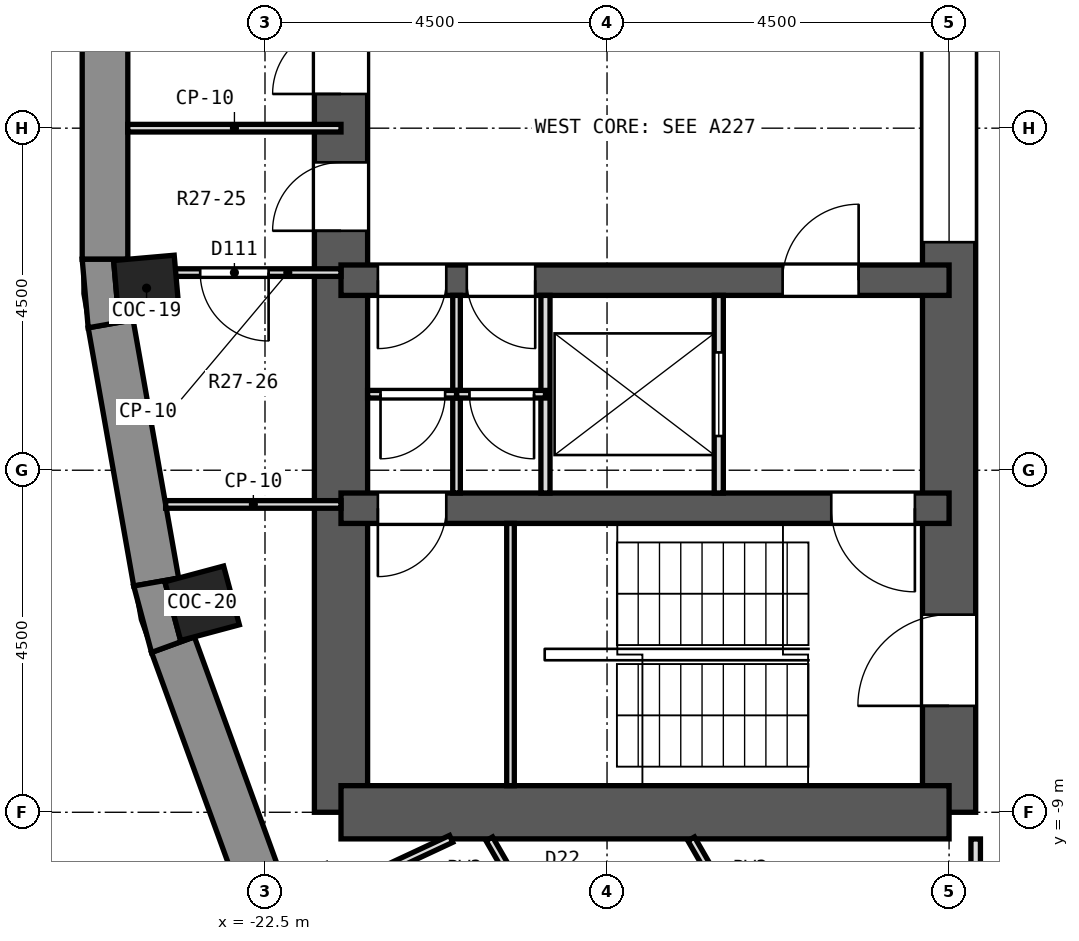
"""IFC4 building model, lengths in metres.
Left out: names, types, materials, properties, quantities, classifications, styles, units other than length and angle.
Written with IfcOpenShell. Run it as: python <this file> out.ifc"""

import sys

from ifc_helpers import new_model, si_unit, direction, frame, frame_2d, origin, origin_2d, place, context, subcontext, project, spatial, polyline, rectangle, outline, extrude, element, fill, save


model = new_model("IFC4")
c1 = context("Model", 3, precision=1e-05, world=origin(), true_north=direction((0.0, 1.0)))
c2 = subcontext(c1, "Body", "Model", "MODEL_VIEW")
j1 = project(units=[si_unit("LENGTHUNIT", "METRE"), si_unit("PLANEANGLEUNIT", "RADIAN")], contexts=[c1])
p1 = place(None, origin())
s1 = spatial("IfcSite", under=j1, at=p1, CompositionType="ELEMENT")
p2 = place(p1, origin())
s2 = spatial("IfcBuilding", under=s1, at=p2, CompositionType="ELEMENT")
p3 = place(p2, frame((0.0, 0.0, 180.6)))
s3 = spatial("IfcBuildingStorey", under=s2, at=p3, CompositionType="ELEMENT", Elevation=180.6)
for number, where, z_axis, x_axis in (
    (1, (-24.058, -2.105, 0.0), (0.0, 0.0, 1.0), (-0.996, -0.087, 0.0)),
    (2, (-23.327, -6.25, 0.0), (0.0, 0.0, 1.0), (-0.966, -0.259, 0.0)),
):
    element("IfcColumn", number, at=place(p3, frame(where, z_axis=z_axis, x_axis=x_axis)), inside=s3, PredefinedType="COLUMN", context=c2, shape_type="SweptSolid", body=[
        extrude(rectangle(XDim=0.8, YDim=0.8, at=origin_2d()), origin(), (0.0, 0.0, 1.0), 3.3),
    ])
p4 = place(p3, frame((-13.5, -9.0, 0.0), z_axis=(0.0, 0.0, 1.0), x_axis=(0.0, 1.0, 0.0)))
e3 = element("IfcWall", 3, at=p4, inside=s3, PredefinedType="SHEAR", context=c2, shape_type="SweptSolid", body=[
    extrude(rectangle(XDim=18.0, YDim=0.7, at=frame_2d((9.0, 0.0))), origin(), (0.0, 0.0, 1.0), 3.3),
])
p5 = place(p4, frame((15.4, 0.0, 0.0)))
e4 = element("IfcOpeningElement", 4, at=p5, cuts=e3, PredefinedType="OPENING", context=c2, shape_type="SweptSolid", body=[
    extrude(rectangle(XDim=1.2, YDim=2.1, at=frame_2d((0.6, 1.05))), frame((0.0, 0.362, 0.0), z_axis=(0.0, -1.0, 0.0), x_axis=(1.0, 0.0, 0.0)), (0.0, 0.0, 1.0), 0.724),
])
p6 = place(p4, frame((1.4, 0.0, 0.0)))
e5 = element("IfcOpeningElement", 5, at=p6, cuts=e3, PredefinedType="OPENING", context=c2, shape_type="SweptSolid", body=[
    extrude(rectangle(XDim=1.2, YDim=2.1, at=frame_2d((0.6, 1.05))), frame((0.0, 0.362, 0.0), z_axis=(0.0, -1.0, 0.0), x_axis=(1.0, 0.0, 0.0)), (0.0, 0.0, 1.0), 0.724),
])
p7 = place(p4, frame((7.5, 0.0, 0.0)))
e6 = element("IfcOpeningElement", 6, at=p7, cuts=e3, PredefinedType="OPENING", context=c2, shape_type="SweptSolid", body=[
    extrude(rectangle(XDim=3.0, YDim=2.4, at=frame_2d((1.5, 1.2))), frame((0.0, 0.362, 0.0), z_axis=(0.0, -1.0, 0.0), x_axis=(1.0, 0.0, 0.0)), (0.0, 0.0, 1.0), 0.724),
])
p8 = place(p3, frame((-21.5, -9.0, 0.0), z_axis=(0.0, 0.0, 1.0), x_axis=(0.0, 1.0, 0.0)))
e7 = element("IfcWall", 7, at=p8, inside=s3, PredefinedType="SHEAR", context=c2, shape_type="SweptSolid", body=[
    extrude(rectangle(XDim=18.0, YDim=0.7, at=frame_2d((9.0, 0.0))), origin(), (0.0, 0.0, 1.0), 3.3),
])
p9 = place(p8, frame((9.45, 0.0, 0.0)))
e8 = element("IfcOpeningElement", 8, at=p9, cuts=e7, PredefinedType="OPENING", context=c2, shape_type="SweptSolid", body=[
    extrude(rectangle(XDim=0.9, YDim=2.1, at=frame_2d((0.45, 1.05))), frame((0.0, 0.362, 0.0), z_axis=(0.0, -1.0, 0.0), x_axis=(1.0, 0.0, 0.0)), (0.0, 0.0, 1.0), 0.724),
])
p10 = place(p8, frame((7.65, 0.0, 0.0)))
e9 = element("IfcOpeningElement", 9, at=p10, cuts=e7, PredefinedType="OPENING", context=c2, shape_type="SweptSolid", body=[
    extrude(rectangle(XDim=0.9, YDim=2.1, at=frame_2d((0.45, 1.05))), frame((0.0, 0.362, 0.0), z_axis=(0.0, -1.0, 0.0), x_axis=(1.0, 0.0, 0.0)), (0.0, 0.0, 1.0), 0.724),
])
p11 = place(p3, frame((-13.5, -9.0, 0.0), z_axis=(0.0, 0.0, 1.0), x_axis=(-1.0, 0.0, 0.0)))
e10 = element("IfcWall", 10, at=p11, inside=s3, PredefinedType="SHEAR", context=c2, shape_type="SweptSolid", body=[
    extrude(rectangle(XDim=8.0, YDim=0.7, at=frame_2d((4.0, 0.0))), origin(), (0.0, 0.0, 1.0), 3.3),
])
p12 = place(p3, frame((-13.5, -5.0, 0.0), z_axis=(0.0, 0.0, 1.0), x_axis=(-1.0, 0.0, 0.0)))
e11 = element("IfcWall", 11, at=p12, inside=s3, PredefinedType="SHEAR", context=c2, shape_type="SweptSolid", body=[
    extrude(rectangle(XDim=8.0, YDim=0.4, at=frame_2d((4.0, 0.0))), origin(), (0.0, 0.0, 1.0), 3.3),
])
p13 = place(p12, frame((6.615, 0.0, 0.0)))
e12 = element("IfcOpeningElement", 12, at=p13, cuts=e11, PredefinedType="OPENING", context=c2, shape_type="SweptSolid", body=[
    extrude(rectangle(XDim=0.9, YDim=2.1, at=frame_2d((0.45, 1.05))), frame((0.0, 0.212, 0.0), z_axis=(0.0, -1.0, 0.0), x_axis=(1.0, 0.0, 0.0)), (0.0, 0.0, 1.0), 0.424),
])
p14 = place(p12, frame((0.45, 0.0, 0.0)))
e13 = element("IfcOpeningElement", 13, at=p14, cuts=e11, PredefinedType="OPENING", context=c2, shape_type="SweptSolid", body=[
    extrude(rectangle(XDim=1.1, YDim=2.1, at=frame_2d((0.55, 1.05))), frame((0.0, 0.212, 0.0), z_axis=(0.0, -1.0, 0.0), x_axis=(1.0, 0.0, 0.0)), (0.0, 0.0, 1.0), 0.424),
])
p15 = place(p3, frame((-13.5, -2.0, 0.0), z_axis=(0.0, 0.0, 1.0), x_axis=(-1.0, 0.0, 0.0)))
e14 = element("IfcWall", 14, at=p15, inside=s3, PredefinedType="SHEAR", context=c2, shape_type="SweptSolid", body=[
    extrude(rectangle(XDim=8.0, YDim=0.4, at=frame_2d((4.0, 0.0))), origin(), (0.0, 0.0, 1.0), 3.3),
])
p16 = place(p15, frame((1.19, 0.0, 0.0)))
e15 = element("IfcOpeningElement", 15, at=p16, cuts=e14, PredefinedType="OPENING", context=c2, shape_type="SweptSolid", body=[
    extrude(rectangle(XDim=1.0, YDim=2.1, at=frame_2d((0.5, 1.05))), frame((0.0, 0.212, 0.0), z_axis=(0.0, -1.0, 0.0), x_axis=(1.0, 0.0, 0.0)), (0.0, 0.0, 1.0), 0.424),
])
p17 = place(p15, frame((5.445, 0.0, 0.0)))
e16 = element("IfcOpeningElement", 16, at=p17, cuts=e14, PredefinedType="OPENING", context=c2, shape_type="SweptSolid", body=[
    extrude(rectangle(XDim=0.9, YDim=2.1, at=frame_2d((0.45, 1.05))), frame((0.0, 0.212, 0.0), z_axis=(0.0, -1.0, 0.0), x_axis=(1.0, 0.0, 0.0)), (0.0, 0.0, 1.0), 0.424),
])
p18 = place(p15, frame((6.615, 0.0, 0.0)))
e17 = element("IfcOpeningElement", 17, at=p18, cuts=e14, PredefinedType="OPENING", context=c2, shape_type="SweptSolid", body=[
    extrude(rectangle(XDim=0.9, YDim=2.1, at=frame_2d((0.45, 1.05))), frame((0.0, 0.212, 0.0), z_axis=(0.0, -1.0, 0.0), x_axis=(1.0, 0.0, 0.0)), (0.0, 0.0, 1.0), 0.424),
])
for number, where, z_axis, x_axis in (
    (18, (-24.605, 1.725, 0.0), (0.0, 0.0, 1.0), (0.0, -1.0, 0.0)),
    (19, (-24.531, -2.574, 0.0), (0.0, 0.0, 1.0), (0.174, -0.985, 0.0)),
    (20, (-23.711, -6.794, 0.0), (0.0, 0.0, 1.0), (0.342, -0.94, 0.0)),
):
    element("IfcWall", number, at=place(p3, frame(where, z_axis=z_axis, x_axis=x_axis)), inside=s3, PredefinedType="SOLIDWALL", context=c2, shape_type="SweptSolid", body=[
        extrude(rectangle(XDim=3.45, YDim=0.6, at=frame_2d((1.725, 0.0))), origin(), (0.0, 0.0, 1.0), 2.85),
    ])
p19 = place(p3, origin())
e21 = element("IfcWall", 21, at=p19, inside=s3, PredefinedType="SOLIDWALL", context=c2, shape_type="SweptSolid", body=[
    extrude(outline(polyline([(-24.905, -1.725), (-24.826, -2.626), (-24.235, -2.522), (-24.422, -2.538), (-24.491, -1.741), (-24.305, -1.725), (-24.905, -1.725)])), origin(), (0.0, 0.0, 1.0), 2.85),
])
p20 = place(p3, origin())
e22 = element("IfcWall", 22, at=p20, inside=s3, PredefinedType="SOLIDWALL", context=c2, shape_type="SweptSolid", body=[
    extrude(outline(polyline([(-24.227, -6.023), (-23.993, -6.897), (-23.429, -6.692), (-23.61, -6.74), (-23.817, -5.968), (-23.636, -5.919), (-24.227, -6.023)])), origin(), (0.0, 0.0, 1.0), 2.85),
])
p21 = place(p3, frame((-19.549, -9.35, 0.0), z_axis=(0.0, 0.0, 1.0), x_axis=(0.500006872736, -0.866021435772, 0.0)))
e23 = element("IfcWall", 23, at=p21, inside=s3, PredefinedType="PARTITIONING", context=c2, shape_type="SweptSolid", body=[
    extrude(rectangle(XDim=2.254, YDim=0.1, at=frame_2d((1.127, 0.0))), origin(), (0.0, 0.0, 1.0), 2.85),
])
p22 = place(p21, frame((0.727, 0.0, 0.0)))
e24 = element("IfcOpeningElement", 24, at=p22, cuts=e23, PredefinedType="OPENING", context=c2, shape_type="SweptSolid", body=[
    extrude(rectangle(XDim=0.8, YDim=2.1, at=frame_2d((0.4, 1.05))), frame((0.0, 0.062, 0.0), z_axis=(0.0, -1.0, 0.0), x_axis=(1.0, 0.0, 0.0)), (0.0, 0.0, 1.0), 0.124),
])
p23 = place(p3, frame((-16.893, -9.35, 0.0), z_axis=(0.0, 0.0, 1.0), x_axis=(0.499699344759, -0.866198917598, 0.0)))
e25 = element("IfcWall", 25, at=p23, inside=s3, PredefinedType="PARTITIONING", context=c2, shape_type="SweptSolid", body=[
    extrude(rectangle(XDim=0.915, YDim=0.1, at=frame_2d((0.457, 0.0))), origin(), (0.0, 0.0, 1.0), 2.85),
])
p24 = place(p3, frame((-21.516, -10.033, 0.0), z_axis=(0.0, 0.0, 1.0), x_axis=(0.906329754533, 0.422571149096, 0.0)))
e26 = element("IfcWall", 26, at=p24, inside=s3, PredefinedType="PARTITIONING", context=c2, shape_type="SweptSolid", body=[
    extrude(rectangle(XDim=1.616, YDim=0.1, at=frame_2d((0.808, 0.0))), origin(), (0.0, 0.0, 1.0), 2.85),
])
p25 = place(p3, frame((-13.15, -11.567, 0.0), z_axis=(0.0, 0.0, 1.0), x_axis=(0.0, 1.0, 0.0)))
e27 = element("IfcWall", 27, at=p25, inside=s3, PredefinedType="PARTITIONING", context=c2, shape_type="SweptSolid", body=[
    extrude(rectangle(XDim=2.216, YDim=0.125, at=frame_2d((1.108, 0.0))), origin(), (0.0, 0.0, 1.0), 2.85),
])
p26 = place(p3, frame((-21.5, -4.95, 0.0), z_axis=(0.0, 0.0, 1.0), x_axis=(-1.0, 0.0, 0.0)))
e28 = element("IfcWall", 28, at=p26, inside=s3, PredefinedType="PARTITIONING", context=c2, shape_type="SweptSolid", body=[
    extrude(rectangle(XDim=2.307, YDim=0.1, at=frame_2d((1.153, 0.0))), origin(), (0.0, 0.0, 1.0), 2.85),
])
p27 = place(p3, frame((-21.5, -1.9, 0.0), z_axis=(0.0, 0.0, 1.0), x_axis=(-1.0, 0.0, 0.0)))
e29 = element("IfcWall", 29, at=p27, inside=s3, PredefinedType="PARTITIONING", context=c2, shape_type="SweptSolid", body=[
    extrude(rectangle(XDim=2.805, YDim=0.1, at=frame_2d((1.402, 0.0))), origin(), (0.0, 0.0, 1.0), 2.85),
])
p28 = place(p27, frame((0.952, 0.0, 0.0)))
e30 = element("IfcOpeningElement", 30, at=p28, cuts=e29, PredefinedType="OPENING", context=c2, shape_type="SweptSolid", body=[
    extrude(rectangle(XDim=0.9, YDim=2.1, at=frame_2d((0.45, 1.05))), frame((0.0, 0.062, 0.0), z_axis=(0.0, -1.0, 0.0), x_axis=(1.0, 0.0, 0.0)), (0.0, 0.0, 1.0), 0.124),
])
p29 = place(p3, frame((-21.5, 0.0, 0.0), z_axis=(0.0, 0.0, 1.0), x_axis=(-1.0, 0.0, 0.0)))
e31 = element("IfcWall", 31, at=p29, inside=s3, PredefinedType="PARTITIONING", context=c2, shape_type="SweptSolid", body=[
    extrude(rectangle(XDim=2.805, YDim=0.1, at=frame_2d((1.402, 0.0))), origin(), (0.0, 0.0, 1.0), 2.85),
])
p30 = place(p3, frame((-16.53, -4.8, 0.0), z_axis=(0.0, 0.0, 1.0), x_axis=(0.0, 1.0, 0.0)))
e32 = element("IfcWall", 32, at=p30, inside=s3, PredefinedType="PARTITIONING", context=c2, shape_type="SweptSolid", body=[
    extrude(rectangle(XDim=2.6, YDim=0.12, at=frame_2d((1.3, 0.0))), origin(), (0.0, 0.0, 1.0), 2.85),
])
p31 = place(p30, frame((0.75, 0.0, 0.0)))
e33 = element("IfcOpeningElement", 33, at=p31, cuts=e32, PredefinedType="OPENING", context=c2, shape_type="SweptSolid", body=[
    extrude(rectangle(XDim=1.1, YDim=2.1, at=frame_2d((0.55, 1.05))), frame((0.0, 0.072, 0.0), z_axis=(0.0, -1.0, 0.0), x_axis=(1.0, 0.0, 0.0)), (0.0, 0.0, 1.0), 0.144),
])
p32 = place(p3, frame((-18.81, -4.8, 0.0), z_axis=(0.0, 0.0, 1.0), x_axis=(0.0, 1.0, 0.0)))
e34 = element("IfcWall", 34, at=p32, inside=s3, PredefinedType="PARTITIONING", context=c2, shape_type="SweptSolid", body=[
    extrude(rectangle(XDim=2.6, YDim=0.12, at=frame_2d((1.3, 0.0))), origin(), (0.0, 0.0, 1.0), 2.85),
])
p33 = place(p3, frame((-19.98, -4.8, 0.0), z_axis=(0.0, 0.0, 1.0), x_axis=(0.0, 1.0, 0.0)))
e35 = element("IfcWall", 35, at=p33, inside=s3, PredefinedType="PARTITIONING", context=c2, shape_type="SweptSolid", body=[
    extrude(rectangle(XDim=2.6, YDim=0.1, at=frame_2d((1.3, 0.0))), origin(), (0.0, 0.0, 1.0), 2.85),
])
p34 = place(p3, frame((-18.81, -3.5, 0.0), z_axis=(0.0, 0.0, 1.0), x_axis=(-1.0, 0.0, 0.0)))
e36 = element("IfcWall", 36, at=p34, inside=s3, PredefinedType="PARTITIONING", context=c2, shape_type="SweptSolid", body=[
    extrude(rectangle(XDim=1.17, YDim=0.1, at=frame_2d((0.585, 0.0))), origin(), (0.0, 0.0, 1.0), 2.85),
])
p35 = place(p34, frame((0.15, 0.0, 0.0)))
e37 = element("IfcOpeningElement", 37, at=p35, cuts=e36, PredefinedType="OPENING", context=c2, shape_type="SweptSolid", body=[
    extrude(rectangle(XDim=0.85, YDim=2.1, at=frame_2d((0.425, 1.05))), frame((0.0, 0.062, 0.0), z_axis=(0.0, -1.0, 0.0), x_axis=(1.0, 0.0, 0.0)), (0.0, 0.0, 1.0), 0.124),
])
p36 = place(p3, frame((-19.98, -3.5, 0.0), z_axis=(0.0, 0.0, 1.0), x_axis=(-1.0, 0.0, 0.0)))
e38 = element("IfcWall", 38, at=p36, inside=s3, PredefinedType="PARTITIONING", context=c2, shape_type="SweptSolid", body=[
    extrude(rectangle(XDim=1.17, YDim=0.1, at=frame_2d((0.585, 0.0))), origin(), (0.0, 0.0, 1.0), 2.85),
])
p37 = place(p36, frame((0.15, 0.0, 0.0)))
e39 = element("IfcOpeningElement", 39, at=p37, cuts=e38, PredefinedType="OPENING", context=c2, shape_type="SweptSolid", body=[
    extrude(rectangle(XDim=0.85, YDim=2.1, at=frame_2d((0.425, 1.05))), frame((0.0, 0.062, 0.0), z_axis=(0.0, -1.0, 0.0), x_axis=(1.0, 0.0, 0.0)), (0.0, 0.0, 1.0), 0.124),
])
p38 = place(p3, frame((-19.27, -8.65, 0.0), z_axis=(0.0, 0.0, 1.0), x_axis=(0.0, 1.0, 0.0)))
e40 = element("IfcWall", 40, at=p38, inside=s3, PredefinedType="PARTITIONING", context=c2, shape_type="SweptSolid", body=[
    extrude(rectangle(XDim=3.45, YDim=0.1, at=frame_2d((1.725, 0.0))), origin(), (0.0, 0.0, 1.0), 2.85),
])
p39 = place(p31, origin())
e41 = element("IfcDoor", 41, at=p39, inside=s3, OperationType="DOUBLE_DOOR_SLIDING", PredefinedType="DOOR", context=c2, shape_type="SweptSolid", body=[
    extrude(rectangle(XDim=1.1, YDim=2.1, at=frame_2d((0.55, 1.05))), frame((0.0, 0.025, 0.0), z_axis=(0.0, -1.0, 0.0), x_axis=(1.0, 0.0, 0.0)), (0.0, 0.0, 1.0), 0.05),
])
fill(e33, e41)
p40 = place(p16, frame((1.0, 0.0, 0.0), z_axis=(0.0, 0.0, 1.0), x_axis=(-1.0, 0.0, 0.0)))
e42 = element("IfcDoor", 42, at=p40, inside=s3, OperationType="SINGLE_SWING_RIGHT", PredefinedType="DOOR", context=c2, shape_type="SweptSolid", body=[
    extrude(rectangle(XDim=1.0, YDim=2.1, at=frame_2d((0.5, 1.05))), frame((0.0, 0.025, 0.0), z_axis=(0.0, -1.0, 0.0), x_axis=(1.0, 0.0, 0.0)), (0.0, 0.0, 1.0), 0.05),
])
fill(e15, e42)
p41 = place(p17, origin())
e43 = element("IfcDoor", 43, at=p41, inside=s3, OperationType="SINGLE_SWING_LEFT", PredefinedType="DOOR", context=c2, shape_type="SweptSolid", body=[
    extrude(rectangle(XDim=0.9, YDim=2.1, at=frame_2d((0.45, 1.05))), frame((0.0, 0.025, 0.0), z_axis=(0.0, -1.0, 0.0), x_axis=(1.0, 0.0, 0.0)), (0.0, 0.0, 1.0), 0.05),
])
fill(e16, e43)
p42 = place(p18, origin())
e44 = element("IfcDoor", 44, at=p42, inside=s3, OperationType="SINGLE_SWING_RIGHT", PredefinedType="DOOR", context=c2, shape_type="SweptSolid", body=[
    extrude(rectangle(XDim=0.9, YDim=2.1, at=frame_2d((0.45, 1.05))), frame((0.0, 0.025, 0.0), z_axis=(0.0, -1.0, 0.0), x_axis=(1.0, 0.0, 0.0)), (0.0, 0.0, 1.0), 0.05),
])
fill(e17, e44)
p43 = place(p9, origin())
e45 = element("IfcDoor", 45, at=p43, inside=s3, OperationType="SINGLE_SWING_LEFT", PredefinedType="DOOR", context=c2, shape_type="SweptSolid", body=[
    extrude(rectangle(XDim=0.9, YDim=2.1, at=frame_2d((0.45, 1.05))), frame((0.0, 0.025, 0.0), z_axis=(0.0, -1.0, 0.0), x_axis=(1.0, 0.0, 0.0)), (0.0, 0.0, 1.0), 0.05),
])
fill(e8, e45)
p44 = place(p28, origin())
e46 = element("IfcDoor", 46, at=p44, inside=s3, OperationType="SINGLE_SWING_LEFT", PredefinedType="DOOR", context=c2, shape_type="SweptSolid", body=[
    extrude(rectangle(XDim=0.9, YDim=2.1, at=frame_2d((0.45, 1.05))), frame((0.0, 0.025, 0.0), z_axis=(0.0, -1.0, 0.0), x_axis=(1.0, 0.0, 0.0)), (0.0, 0.0, 1.0), 0.05),
])
fill(e30, e46)
p45 = place(p10, origin())
e47 = element("IfcDoor", 47, at=p45, inside=s3, OperationType="SINGLE_SWING_LEFT", PredefinedType="DOOR", context=c2, shape_type="SweptSolid", body=[
    extrude(rectangle(XDim=0.9, YDim=2.1, at=frame_2d((0.45, 1.05))), frame((0.0, 0.025, 0.0), z_axis=(0.0, -1.0, 0.0), x_axis=(1.0, 0.0, 0.0)), (0.0, 0.0, 1.0), 0.05),
])
fill(e9, e47)
p46 = place(p35, origin())
e48 = element("IfcDoor", 48, at=p46, inside=s3, OperationType="SINGLE_SWING_LEFT", PredefinedType="DOOR", context=c2, shape_type="SweptSolid", body=[
    extrude(rectangle(XDim=0.85, YDim=2.1, at=frame_2d((0.425, 1.05))), frame((0.0, 0.025, 0.0), z_axis=(0.0, -1.0, 0.0), x_axis=(1.0, 0.0, 0.0)), (0.0, 0.0, 1.0), 0.05),
])
fill(e37, e48)
p47 = place(p37, origin())
e49 = element("IfcDoor", 49, at=p47, inside=s3, OperationType="SINGLE_SWING_RIGHT", PredefinedType="DOOR", context=c2, shape_type="SweptSolid", body=[
    extrude(rectangle(XDim=0.85, YDim=2.1, at=frame_2d((0.425, 1.05))), frame((0.0, 0.025, 0.0), z_axis=(0.0, -1.0, 0.0), x_axis=(1.0, 0.0, 0.0)), (0.0, 0.0, 1.0), 0.05),
])
fill(e39, e49)
p48 = place(p13, origin())
e50 = element("IfcDoor", 50, at=p48, inside=s3, OperationType="SINGLE_SWING_RIGHT", PredefinedType="DOOR", context=c2, shape_type="SweptSolid", body=[
    extrude(rectangle(XDim=0.9, YDim=2.1, at=frame_2d((0.45, 1.05))), frame((0.0, 0.025, 0.0), z_axis=(0.0, -1.0, 0.0), x_axis=(1.0, 0.0, 0.0)), (0.0, 0.0, 1.0), 0.05),
])
fill(e12, e50)
p49 = place(p14, origin())
e51 = element("IfcDoor", 51, at=p49, inside=s3, OperationType="SINGLE_SWING_LEFT", PredefinedType="DOOR", context=c2, shape_type="SweptSolid", body=[
    extrude(rectangle(XDim=1.1, YDim=2.1, at=frame_2d((0.55, 1.05))), frame((0.0, 0.025, 0.0), z_axis=(0.0, -1.0, 0.0), x_axis=(1.0, 0.0, 0.0)), (0.0, 0.0, 1.0), 0.05),
])
fill(e13, e51)
p50 = place(p6, origin())
e52 = element("IfcDoor", 52, at=p50, inside=s3, OperationType="SINGLE_SWING_LEFT", PredefinedType="DOOR", context=c2, shape_type="SweptSolid", body=[
    extrude(rectangle(XDim=1.2, YDim=2.1, at=frame_2d((0.6, 1.05))), frame((0.0, 0.025, 0.0), z_axis=(0.0, -1.0, 0.0), x_axis=(1.0, 0.0, 0.0)), (0.0, 0.0, 1.0), 0.05),
])
fill(e5, e52)
p51 = place(p7, origin())
e53 = element("IfcDoor", 53, at=p51, inside=s3, OperationType="DOUBLE_DOOR_SLIDING", PredefinedType="DOOR", context=c2, shape_type="SweptSolid", body=[
    extrude(rectangle(XDim=3.0, YDim=2.4, at=frame_2d((1.5, 1.2))), frame((0.0, 0.025, 0.0), z_axis=(0.0, -1.0, 0.0), x_axis=(1.0, 0.0, 0.0)), (0.0, 0.0, 1.0), 0.05),
])
fill(e6, e53)
save(model, sys.argv[1])
